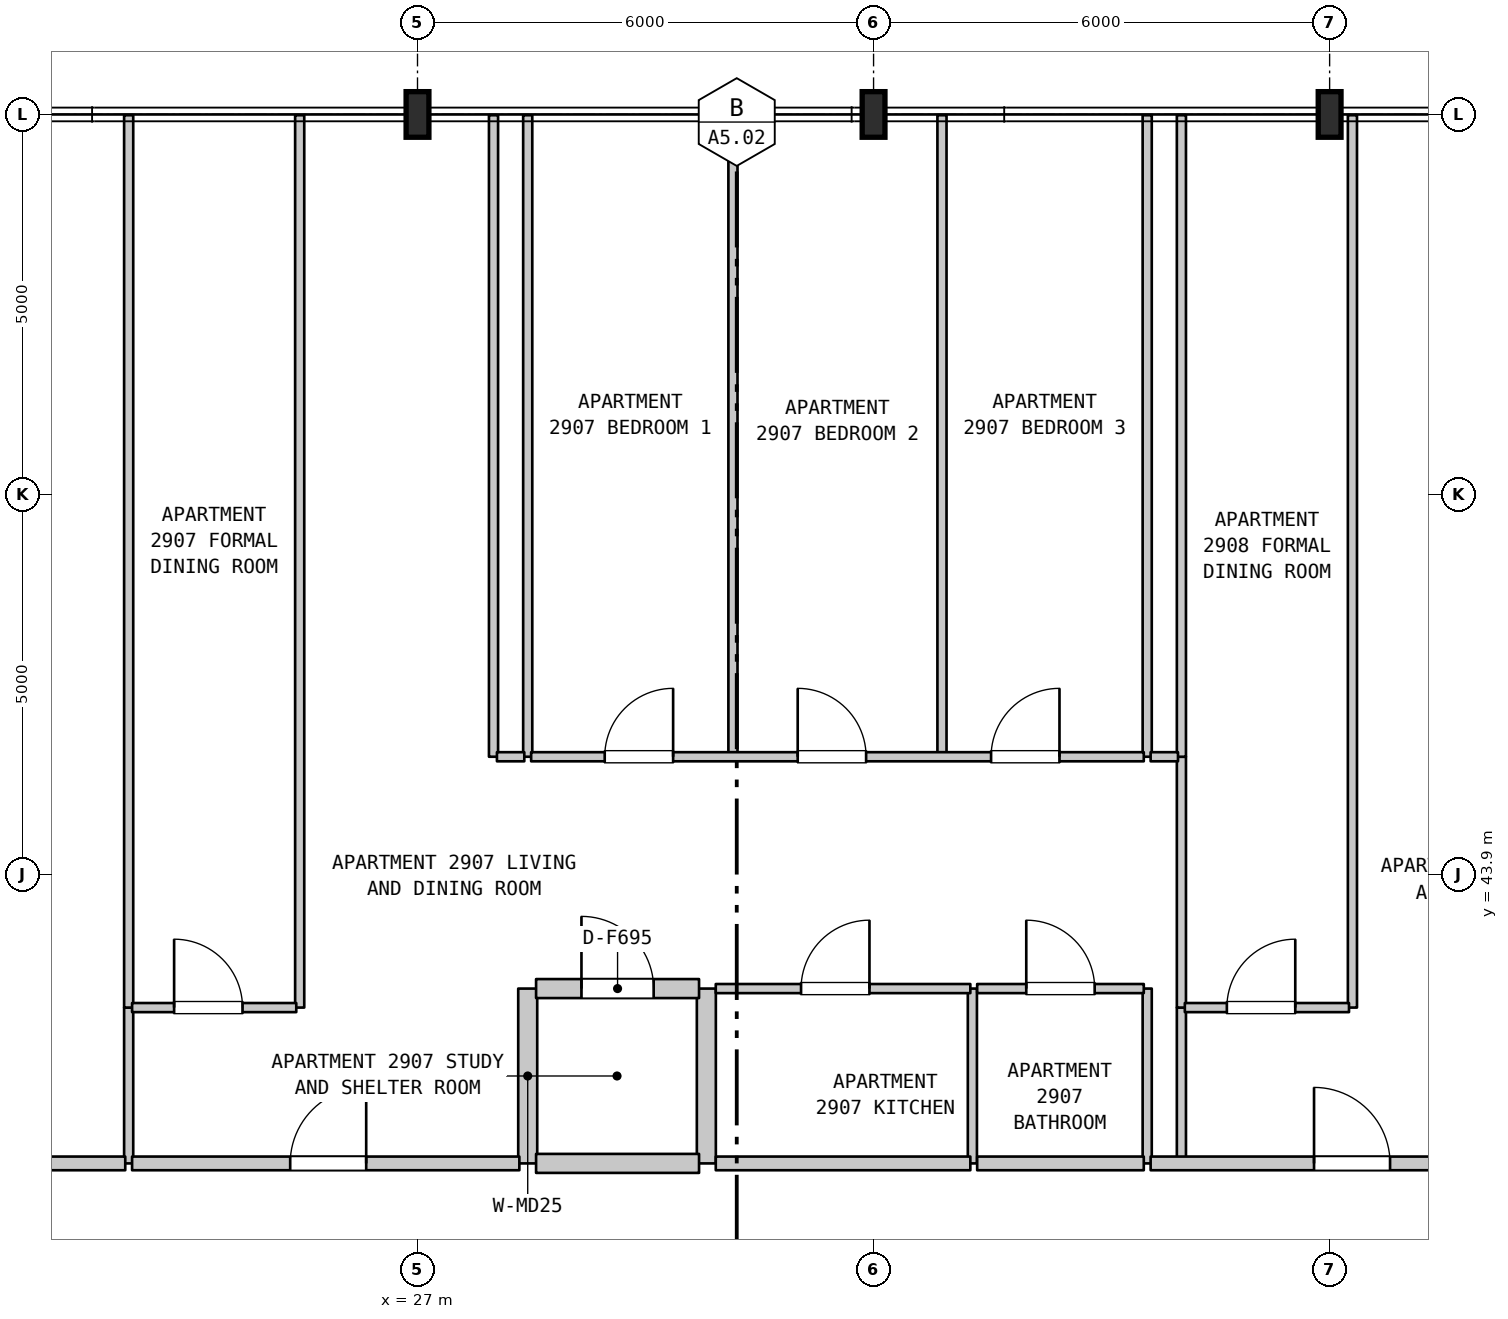
"""IFC4 building model, lengths in metres.
Left out: names, types, materials, properties, quantities, classifications, styles, units other than length and angle.
Written with IfcOpenShell. Run it as: python <this file> out.ifc"""

import sys

from ifc_helpers import new_model, si_unit, direction, frame, frame_2d, origin, origin_2d, place, context, subcontext, project, spatial, rectangle, i_section, extrude, element, fill, save


model = new_model("IFC4")
c1 = context("Model", 3, precision=1e-05, world=origin(), true_north=direction((0.0, 1.0)))
c2 = subcontext(c1, "Body", "Model", "MODEL_VIEW")
j1 = project(units=[si_unit("LENGTHUNIT", "METRE"), si_unit("PLANEANGLEUNIT", "RADIAN")], contexts=[c1])
p1 = place(None, origin())
s1 = spatial("IfcSite", under=j1, at=p1, CompositionType="ELEMENT")
p2 = place(p1, origin())
s2 = spatial("IfcBuilding", under=s1, at=p2, CompositionType="ELEMENT")
p3 = place(p2, frame((0.0, 0.0, 120.5)))
s3 = spatial("IfcBuildingStorey", under=s2, at=p3, CompositionType="ELEMENT", Elevation=120.5)
for number, where, z_axis, x_axis in (
    (1, (27.0, 53.9, 0.0), (0.0, 0.0, 1.0), (1.0, 0.0, 0.0)),
    (2, (33.0, 53.9, 0.0), (0.0, 0.0, 1.0), (1.0, 0.0, 0.0)),
    (3, (39.0, 53.9, 0.0), (0.0, 0.0, 1.0), (1.0, 0.0, 0.0)),
):
    element("IfcColumn", number, at=place(p3, frame(where, z_axis=z_axis, x_axis=x_axis)), inside=s3, PredefinedType="COLUMN", context=c2, shape_type="SweptSolid", body=[
        extrude(i_section(OverallWidth=0.3, OverallDepth=0.6, WebThickness=0.015, FlangeThickness=0.03, FilletRadius=0.027, at=origin_2d()), origin(), (0.0, 0.0, 1.0), 4.8),
    ])
p4 = place(p3, frame((23.2, 40.1, 0.0), z_axis=(0.0, 0.0, 1.0), x_axis=(0.0, 1.0, 0.0)))
e4 = element("IfcWall", 4, at=p4, inside=s3, PredefinedType="PARTITIONING", context=c2, shape_type="SweptSolid", body=[
    extrude(rectangle(XDim=2.05, YDim=0.12, at=frame_2d((1.025, 0.0))), origin(), (0.0, 0.0, 1.0), 4.48),
])
for number, where, z_axis, x_axis in (
    (5, (23.2, 42.15, 0.0), (0.0, 0.0, 1.0), (0.0, 1.0, 0.0)),
    (6, (25.45, 42.15, 0.0), (0.0, 0.0, 1.0), (0.0, 1.0, 0.0)),
):
    element("IfcWall", number, at=place(p3, frame(where, z_axis=z_axis, x_axis=x_axis)), inside=s3, PredefinedType="PARTITIONING", context=c2, shape_type="SweptSolid", body=[
        extrude(rectangle(XDim=11.74, YDim=0.12, at=frame_2d((5.87, 0.0))), origin(), (0.0, 0.0, 1.0), 4.48),
    ])
p5 = place(p3, frame((28.0, 45.45, 0.0), z_axis=(0.0, 0.0, 1.0), x_axis=(0.0, 1.0, 0.0)))
e7 = element("IfcWall", 7, at=p5, inside=s3, PredefinedType="PARTITIONING", context=c2, shape_type="SweptSolid", body=[
    extrude(rectangle(XDim=8.44, YDim=0.12, at=frame_2d((4.22, 0.0))), origin(), (0.0, 0.0, 1.0), 4.48),
])
p6 = place(p3, frame((28.45, 40.1, 0.0), z_axis=(0.0, 0.0, 1.0), x_axis=(0.0, 1.0, 0.0)))
e8 = element("IfcWall", 8, at=p6, inside=s3, PredefinedType="STANDARD", context=c2, shape_type="SweptSolid", body=[
    extrude(rectangle(XDim=2.3, YDim=0.25, at=frame_2d((1.15, 0.0))), origin(), (0.0, 0.0, 1.0), 4.48),
])
p7 = place(p3, frame((28.45, 45.45, 0.0), z_axis=(0.0, 0.0, 1.0), x_axis=(0.0, 1.0, 0.0)))
e9 = element("IfcWall", 9, at=p7, inside=s3, PredefinedType="PARTITIONING", context=c2, shape_type="SweptSolid", body=[
    extrude(rectangle(XDim=8.44, YDim=0.12, at=frame_2d((4.22, 0.0))), origin(), (0.0, 0.0, 1.0), 4.48),
])
p8 = place(p3, frame((30.8, 40.1, 0.0), z_axis=(0.0, 0.0, 1.0), x_axis=(0.0, 1.0, 0.0)))
e10 = element("IfcWall", 10, at=p8, inside=s3, PredefinedType="STANDARD", context=c2, shape_type="SweptSolid", body=[
    extrude(rectangle(XDim=2.3, YDim=0.25, at=frame_2d((1.15, 0.0))), origin(), (0.0, 0.0, 1.0), 4.48),
])
for number, where, z_axis, x_axis in (
    (11, (31.15, 45.45, 0.0), (0.0, 0.0, 1.0), (0.0, 1.0, 0.0)),
    (12, (33.9, 45.45, 0.0), (0.0, 0.0, 1.0), (0.0, 1.0, 0.0)),
):
    element("IfcWall", number, at=place(p3, frame(where, z_axis=z_axis, x_axis=x_axis)), inside=s3, PredefinedType="PARTITIONING", context=c2, shape_type="SweptSolid", body=[
        extrude(rectangle(XDim=8.44, YDim=0.12, at=frame_2d((4.22, 0.0))), origin(), (0.0, 0.0, 1.0), 4.48),
    ])
for number, where, z_axis, x_axis in (
    (13, (34.3, 40.1, 0.0), (0.0, 0.0, 1.0), (0.0, 1.0, 0.0)),
    (14, (36.6, 40.1, 0.0), (0.0, 0.0, 1.0), (0.0, 1.0, 0.0)),
):
    element("IfcWall", number, at=place(p3, frame(where, z_axis=z_axis, x_axis=x_axis)), inside=s3, PredefinedType="PARTITIONING", context=c2, shape_type="SweptSolid", body=[
        extrude(rectangle(XDim=2.3, YDim=0.12, at=frame_2d((1.15, 0.0))), origin(), (0.0, 0.0, 1.0), 4.48),
    ])
p9 = place(p3, frame((36.6, 45.45, 0.0), z_axis=(0.0, 0.0, 1.0), x_axis=(0.0, 1.0, 0.0)))
e15 = element("IfcWall", 15, at=p9, inside=s3, PredefinedType="PARTITIONING", context=c2, shape_type="SweptSolid", body=[
    extrude(rectangle(XDim=8.44, YDim=0.12, at=frame_2d((4.22, 0.0))), origin(), (0.0, 0.0, 1.0), 4.48),
])
p10 = place(p3, frame((37.05, 40.1, 0.0), z_axis=(0.0, 0.0, 1.0), x_axis=(0.0, 1.0, 0.0)))
e16 = element("IfcWall", 16, at=p10, inside=s3, PredefinedType="PARTITIONING", context=c2, shape_type="SweptSolid", body=[
    extrude(rectangle(XDim=2.05, YDim=0.12, at=frame_2d((1.025, 0.0))), origin(), (0.0, 0.0, 1.0), 4.48),
])
p11 = place(p3, frame((37.05, 42.15, 0.0), z_axis=(0.0, 0.0, 1.0), x_axis=(0.0, 1.0, 0.0)))
e17 = element("IfcWall", 17, at=p11, inside=s3, PredefinedType="PARTITIONING", context=c2, shape_type="SweptSolid", body=[
    extrude(rectangle(XDim=3.3, YDim=0.12, at=frame_2d((1.65, 0.0))), origin(), (0.0, 0.0, 1.0), 4.48),
])
p12 = place(p3, frame((37.05, 45.45, 0.0), z_axis=(0.0, 0.0, 1.0), x_axis=(0.0, 1.0, 0.0)))
e18 = element("IfcWall", 18, at=p12, inside=s3, PredefinedType="PARTITIONING", context=c2, shape_type="SweptSolid", body=[
    extrude(rectangle(XDim=8.44, YDim=0.12, at=frame_2d((4.22, 0.0))), origin(), (0.0, 0.0, 1.0), 4.48),
])
p13 = place(p3, frame((39.3, 42.15, 0.0), z_axis=(0.0, 0.0, 1.0), x_axis=(0.0, 1.0, 0.0)))
e19 = element("IfcWall", 19, at=p13, inside=s3, PredefinedType="PARTITIONING", context=c2, shape_type="SweptSolid", body=[
    extrude(rectangle(XDim=11.74, YDim=0.12, at=frame_2d((5.87, 0.0))), origin(), (0.0, 0.0, 1.0), 4.48),
])
p14 = place(p3, frame((20.745, 40.1, 0.0), z_axis=(0.0, 0.0, 1.0), x_axis=(1.0, 0.0, 0.0)))
e20 = element("IfcWall", 20, at=p14, inside=s3, PredefinedType="STANDARD", context=c2, shape_type="SweptSolid", body=[
    extrude(rectangle(XDim=2.41, YDim=0.18, at=frame_2d((1.205, 0.0))), origin(), (0.0, 0.0, 1.0), 4.48),
])
p15 = place(p3, frame((23.245, 40.1, 0.0), z_axis=(0.0, 0.0, 1.0), x_axis=(1.0, 0.0, 0.0)))
e21 = element("IfcWall", 21, at=p15, inside=s3, PredefinedType="STANDARD", context=c2, shape_type="SweptSolid", body=[
    extrude(rectangle(XDim=5.095, YDim=0.18, at=frame_2d((2.547, 0.0))), origin(), (0.0, 0.0, 1.0), 4.48),
])
p16 = place(p15, frame((2.08, 0.0, 0.0)))
e22 = element("IfcOpeningElement", 22, at=p16, cuts=e21, PredefinedType="OPENING", context=c2, shape_type="SweptSolid", body=[
    extrude(rectangle(XDim=1.0, YDim=2.15, at=frame_2d((0.5, 1.075))), frame((0.0, 0.1, 0.0), z_axis=(0.0, -1.0, 0.0), x_axis=(1.0, 0.0, 0.0)), (0.0, 0.0, 1.0), 0.2),
])
p17 = place(p3, frame((28.56, 40.1, 0.0), z_axis=(0.0, 0.0, 1.0), x_axis=(1.0, 0.0, 0.0)))
e23 = element("IfcWall", 23, at=p17, inside=s3, PredefinedType="STANDARD", context=c2, shape_type="SweptSolid", body=[
    extrude(rectangle(XDim=2.144, YDim=0.25, at=frame_2d((1.072, 0.0))), origin(), (0.0, 0.0, 1.0), 4.48),
])
p18 = place(p3, frame((30.924, 40.1, 0.0), z_axis=(0.0, 0.0, 1.0), x_axis=(1.0, 0.0, 0.0)))
e24 = element("IfcWall", 24, at=p18, inside=s3, PredefinedType="STANDARD", context=c2, shape_type="SweptSolid", body=[
    extrude(rectangle(XDim=3.349, YDim=0.18, at=frame_2d((1.674, 0.0))), origin(), (0.0, 0.0, 1.0), 4.48),
])
p19 = place(p3, frame((34.363, 40.1, 0.0), z_axis=(0.0, 0.0, 1.0), x_axis=(1.0, 0.0, 0.0)))
e25 = element("IfcWall", 25, at=p19, inside=s3, PredefinedType="STANDARD", context=c2, shape_type="SweptSolid", body=[
    extrude(rectangle(XDim=2.192, YDim=0.18, at=frame_2d((1.096, 0.0))), origin(), (0.0, 0.0, 1.0), 4.48),
])
p20 = place(p3, frame((36.645, 40.1, 0.0), z_axis=(0.0, 0.0, 1.0), x_axis=(1.0, 0.0, 0.0)))
e26 = element("IfcWall", 26, at=p20, inside=s3, PredefinedType="STANDARD", context=c2, shape_type="SweptSolid", body=[
    extrude(rectangle(XDim=5.3, YDim=0.18, at=frame_2d((2.65, 0.0))), origin(), (0.0, 0.0, 1.0), 4.48),
])
p21 = place(p20, frame((2.15, 0.0, 0.0)))
e27 = element("IfcOpeningElement", 27, at=p21, cuts=e26, PredefinedType="OPENING", context=c2, shape_type="SweptSolid", body=[
    extrude(rectangle(XDim=1.0, YDim=2.15, at=frame_2d((0.5, 1.075))), frame((0.0, 0.1, 0.0), z_axis=(0.0, -1.0, 0.0), x_axis=(1.0, 0.0, 0.0)), (0.0, 0.0, 1.0), 0.2),
])
p22 = place(p3, frame((23.245, 42.15, 0.0), z_axis=(0.0, 0.0, 1.0), x_axis=(1.0, 0.0, 0.0)))
e28 = element("IfcWall", 28, at=p22, inside=s3, PredefinedType="PARTITIONING", context=c2, shape_type="SweptSolid", body=[
    extrude(rectangle(XDim=2.16, YDim=0.12, at=frame_2d((1.08, 0.0))), origin(), (0.0, 0.0, 1.0), 4.48),
])
p23 = place(p22, frame((0.553, 0.0, 0.0)))
e29 = element("IfcOpeningElement", 29, at=p23, cuts=e28, PredefinedType="OPENING", context=c2, shape_type="SweptSolid", body=[
    extrude(rectangle(XDim=0.9, YDim=2.15, at=frame_2d((0.45, 1.075))), frame((0.0, 0.07, 0.0), z_axis=(0.0, -1.0, 0.0), x_axis=(1.0, 0.0, 0.0)), (0.0, 0.0, 1.0), 0.14),
])
p24 = place(p3, frame((37.095, 42.15, 0.0), z_axis=(0.0, 0.0, 1.0), x_axis=(1.0, 0.0, 0.0)))
e30 = element("IfcWall", 30, at=p24, inside=s3, PredefinedType="PARTITIONING", context=c2, shape_type="SweptSolid", body=[
    extrude(rectangle(XDim=2.16, YDim=0.12, at=frame_2d((1.08, 0.0))), origin(), (0.0, 0.0, 1.0), 4.48),
])
p25 = place(p24, frame((0.553, 0.0, 0.0)))
e31 = element("IfcOpeningElement", 31, at=p25, cuts=e30, PredefinedType="OPENING", context=c2, shape_type="SweptSolid", body=[
    extrude(rectangle(XDim=0.9, YDim=2.15, at=frame_2d((0.45, 1.075))), frame((0.0, 0.07, 0.0), z_axis=(0.0, -1.0, 0.0), x_axis=(1.0, 0.0, 0.0)), (0.0, 0.0, 1.0), 0.14),
])
p26 = place(p3, frame((28.56, 42.4, 0.0), z_axis=(0.0, 0.0, 1.0), x_axis=(1.0, 0.0, 0.0)))
e32 = element("IfcWall", 32, at=p26, inside=s3, PredefinedType="STANDARD", context=c2, shape_type="SweptSolid", body=[
    extrude(rectangle(XDim=2.144, YDim=0.25, at=frame_2d((1.072, 0.0))), origin(), (0.0, 0.0, 1.0), 4.48),
])
p27 = place(p26, frame((0.597, 0.0, 0.0)))
e33 = element("IfcOpeningElement", 33, at=p27, cuts=e32, PredefinedType="OPENING", context=c2, shape_type="SweptSolid", body=[
    extrude(rectangle(XDim=0.95, YDim=2.15, at=frame_2d((0.475, 1.075))), frame((0.0, 0.135, 0.0), z_axis=(0.0, -1.0, 0.0), x_axis=(1.0, 0.0, 0.0)), (0.0, 0.0, 1.0), 0.27),
])
p28 = place(p3, frame((30.924, 42.4, 0.0), z_axis=(0.0, 0.0, 1.0), x_axis=(1.0, 0.0, 0.0)))
e34 = element("IfcWall", 34, at=p28, inside=s3, PredefinedType="PARTITIONING", context=c2, shape_type="SweptSolid", body=[
    extrude(rectangle(XDim=3.349, YDim=0.12, at=frame_2d((1.674, 0.0))), origin(), (0.0, 0.0, 1.0), 4.48),
])
p29 = place(p28, frame((1.122, 0.0, 0.0)))
e35 = element("IfcOpeningElement", 35, at=p29, cuts=e34, PredefinedType="OPENING", context=c2, shape_type="SweptSolid", body=[
    extrude(rectangle(XDim=0.9, YDim=2.15, at=frame_2d((0.45, 1.075))), frame((0.0, 0.07, 0.0), z_axis=(0.0, -1.0, 0.0), x_axis=(1.0, 0.0, 0.0)), (0.0, 0.0, 1.0), 0.14),
])
p30 = place(p3, frame((34.363, 42.4, 0.0), z_axis=(0.0, 0.0, 1.0), x_axis=(1.0, 0.0, 0.0)))
e36 = element("IfcWall", 36, at=p30, inside=s3, PredefinedType="PARTITIONING", context=c2, shape_type="SweptSolid", body=[
    extrude(rectangle(XDim=2.192, YDim=0.12, at=frame_2d((1.096, 0.0))), origin(), (0.0, 0.0, 1.0), 4.48),
])
p31 = place(p30, frame((0.646, 0.0, 0.0)))
e37 = element("IfcOpeningElement", 37, at=p31, cuts=e36, PredefinedType="OPENING", context=c2, shape_type="SweptSolid", body=[
    extrude(rectangle(XDim=0.9, YDim=2.1, at=frame_2d((0.45, 1.05))), frame((0.0, 0.07, 0.0), z_axis=(0.0, -1.0, 0.0), x_axis=(1.0, 0.0, 0.0)), (0.0, 0.0, 1.0), 0.14),
])
p32 = place(p3, frame((28.045, 45.45, 0.0), z_axis=(0.0, 0.0, 1.0), x_axis=(1.0, 0.0, 0.0)))
e38 = element("IfcWall", 38, at=p32, inside=s3, PredefinedType="PARTITIONING", context=c2, shape_type="SweptSolid", body=[
    extrude(rectangle(XDim=0.36, YDim=0.12, at=frame_2d((0.18, 0.0))), origin(), (0.0, 0.0, 1.0), 4.48),
])
p33 = place(p3, frame((28.495, 45.45, 0.0), z_axis=(0.0, 0.0, 1.0), x_axis=(1.0, 0.0, 0.0)))
e39 = element("IfcWall", 39, at=p33, inside=s3, PredefinedType="PARTITIONING", context=c2, shape_type="SweptSolid", body=[
    extrude(rectangle(XDim=8.06, YDim=0.12, at=frame_2d((4.03, 0.0))), origin(), (0.0, 0.0, 1.0), 4.48),
])
p34 = place(p33, frame((0.968, 0.0, 0.0)))
e40 = element("IfcOpeningElement", 40, at=p34, cuts=e39, PredefinedType="OPENING", context=c2, shape_type="SweptSolid", body=[
    extrude(rectangle(XDim=0.9, YDim=2.15, at=frame_2d((0.45, 1.075))), frame((0.0, 0.07, 0.0), z_axis=(0.0, -1.0, 0.0), x_axis=(1.0, 0.0, 0.0)), (0.0, 0.0, 1.0), 0.14),
])
p35 = place(p33, frame((3.507, 0.0, 0.0)))
e41 = element("IfcOpeningElement", 41, at=p35, cuts=e39, PredefinedType="OPENING", context=c2, shape_type="SweptSolid", body=[
    extrude(rectangle(XDim=0.9, YDim=2.15, at=frame_2d((0.45, 1.075))), frame((0.0, 0.07, 0.0), z_axis=(0.0, -1.0, 0.0), x_axis=(1.0, 0.0, 0.0)), (0.0, 0.0, 1.0), 0.14),
])
p36 = place(p33, frame((6.051, 0.0, 0.0)))
e42 = element("IfcOpeningElement", 42, at=p36, cuts=e39, PredefinedType="OPENING", context=c2, shape_type="SweptSolid", body=[
    extrude(rectangle(XDim=0.9, YDim=2.15, at=frame_2d((0.45, 1.075))), frame((0.0, 0.07, 0.0), z_axis=(0.0, -1.0, 0.0), x_axis=(1.0, 0.0, 0.0)), (0.0, 0.0, 1.0), 0.14),
])
p37 = place(p3, frame((36.645, 45.45, 0.0), z_axis=(0.0, 0.0, 1.0), x_axis=(1.0, 0.0, 0.0)))
e43 = element("IfcWall", 43, at=p37, inside=s3, PredefinedType="PARTITIONING", context=c2, shape_type="SweptSolid", body=[
    extrude(rectangle(XDim=0.36, YDim=0.12, at=frame_2d((0.18, 0.0))), origin(), (0.0, 0.0, 1.0), 4.48),
])
p38 = place(p16, origin())
e44 = element("IfcDoor", 44, at=p38, inside=s3, OperationType="SINGLE_SWING_RIGHT", PredefinedType="DOOR", context=c2, shape_type="SweptSolid", body=[
    extrude(rectangle(XDim=1.0, YDim=2.15, at=frame_2d((0.5, 1.075))), frame((0.0, 0.025, 0.0), z_axis=(0.0, -1.0, 0.0), x_axis=(1.0, 0.0, 0.0)), (0.0, 0.0, 1.0), 0.05),
])
fill(e22, e44)
p39 = place(p21, origin())
e45 = element("IfcDoor", 45, at=p39, inside=s3, OperationType="SINGLE_SWING_LEFT", PredefinedType="DOOR", context=c2, shape_type="SweptSolid", body=[
    extrude(rectangle(XDim=1.0, YDim=2.15, at=frame_2d((0.5, 1.075))), frame((0.0, 0.025, 0.0), z_axis=(0.0, -1.0, 0.0), x_axis=(1.0, 0.0, 0.0)), (0.0, 0.0, 1.0), 0.05),
])
fill(e27, e45)
p40 = place(p23, origin())
e46 = element("IfcDoor", 46, at=p40, inside=s3, OperationType="SINGLE_SWING_LEFT", PredefinedType="DOOR", context=c2, shape_type="SweptSolid", body=[
    extrude(rectangle(XDim=0.9, YDim=2.15, at=frame_2d((0.45, 1.075))), frame((0.0, 0.025, 0.0), z_axis=(0.0, -1.0, 0.0), x_axis=(1.0, 0.0, 0.0)), (0.0, 0.0, 1.0), 0.05),
])
fill(e29, e46)
p41 = place(p25, origin())
e47 = element("IfcDoor", 47, at=p41, inside=s3, OperationType="SINGLE_SWING_RIGHT", PredefinedType="DOOR", context=c2, shape_type="SweptSolid", body=[
    extrude(rectangle(XDim=0.9, YDim=2.15, at=frame_2d((0.45, 1.075))), frame((0.0, 0.025, 0.0), z_axis=(0.0, -1.0, 0.0), x_axis=(1.0, 0.0, 0.0)), (0.0, 0.0, 1.0), 0.05),
])
fill(e31, e47)
p42 = place(p27, origin())
e48 = element("IfcDoor", 48, at=p42, inside=s3, OperationType="SINGLE_SWING_LEFT", PredefinedType="DOOR", context=c2, shape_type="SweptSolid", body=[
    extrude(rectangle(XDim=0.95, YDim=2.15, at=frame_2d((0.475, 1.075))), frame((0.0, 0.025, 0.0), z_axis=(0.0, -1.0, 0.0), x_axis=(1.0, 0.0, 0.0)), (0.0, 0.0, 1.0), 0.05),
])
fill(e33, e48)
p43 = place(p29, origin())
e49 = element("IfcDoor", 49, at=p43, inside=s3, OperationType="SINGLE_SWING_RIGHT", PredefinedType="DOOR", context=c2, shape_type="SweptSolid", body=[
    extrude(rectangle(XDim=0.9, YDim=2.15, at=frame_2d((0.45, 1.075))), frame((0.0, 0.025, 0.0), z_axis=(0.0, -1.0, 0.0), x_axis=(1.0, 0.0, 0.0)), (0.0, 0.0, 1.0), 0.05),
])
fill(e35, e49)
p44 = place(p31, origin())
e50 = element("IfcDoor", 50, at=p44, inside=s3, OperationType="SINGLE_SWING_LEFT", PredefinedType="DOOR", context=c2, shape_type="SweptSolid", body=[
    extrude(rectangle(XDim=0.9, YDim=2.1, at=frame_2d((0.45, 1.05))), frame((0.0, 0.025, 0.0), z_axis=(0.0, -1.0, 0.0), x_axis=(1.0, 0.0, 0.0)), (0.0, 0.0, 1.0), 0.05),
])
fill(e37, e50)
p45 = place(p34, origin())
e51 = element("IfcDoor", 51, at=p45, inside=s3, OperationType="SINGLE_SWING_RIGHT", PredefinedType="DOOR", context=c2, shape_type="SweptSolid", body=[
    extrude(rectangle(XDim=0.9, YDim=2.15, at=frame_2d((0.45, 1.075))), frame((0.0, 0.025, 0.0), z_axis=(0.0, -1.0, 0.0), x_axis=(1.0, 0.0, 0.0)), (0.0, 0.0, 1.0), 0.05),
])
fill(e40, e51)
p46 = place(p35, origin())
e52 = element("IfcDoor", 52, at=p46, inside=s3, OperationType="SINGLE_SWING_LEFT", PredefinedType="DOOR", context=c2, shape_type="SweptSolid", body=[
    extrude(rectangle(XDim=0.9, YDim=2.15, at=frame_2d((0.45, 1.075))), frame((0.0, 0.025, 0.0), z_axis=(0.0, -1.0, 0.0), x_axis=(1.0, 0.0, 0.0)), (0.0, 0.0, 1.0), 0.05),
])
fill(e41, e52)
p47 = place(p36, origin())
e53 = element("IfcDoor", 53, at=p47, inside=s3, OperationType="SINGLE_SWING_RIGHT", PredefinedType="DOOR", context=c2, shape_type="SweptSolid", body=[
    extrude(rectangle(XDim=0.9, YDim=2.15, at=frame_2d((0.45, 1.075))), frame((0.0, 0.025, 0.0), z_axis=(0.0, -1.0, 0.0), x_axis=(1.0, 0.0, 0.0)), (0.0, 0.0, 1.0), 0.05),
])
fill(e42, e53)
save(model, sys.argv[1])
